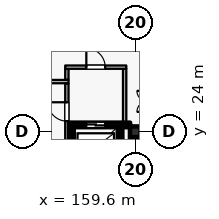
"""IFC4 building model, lengths in metres.
Left out: names, types, materials, properties, quantities, classifications, styles, units other than length and angle.
Written with IfcOpenShell. Run it as: python <this file> out.ifc"""

import sys

from ifc_helpers import new_model, si_unit, direction, frame, frame_2d, origin, origin_2d, place, context, subcontext, project, spatial, rectangle, extrude, element, fill, save


model = new_model("IFC4")
c1 = context("Model", 3, precision=1e-05, world=origin(), true_north=direction((0.0, 1.0)))
c2 = subcontext(c1, "Body", "Model", "MODEL_VIEW")
j1 = project(units=[si_unit("LENGTHUNIT", "METRE"), si_unit("PLANEANGLEUNIT", "RADIAN")], contexts=[c1])
p1 = place(None, origin())
s1 = spatial("IfcSite", under=j1, at=p1, CompositionType="ELEMENT")
p2 = place(p1, origin())
s2 = spatial("IfcBuilding", under=s1, at=p2, CompositionType="ELEMENT")
p3 = place(p2, frame((0.0, 0.0, 32.4)))
s3 = spatial("IfcBuildingStorey", under=s2, at=p3, CompositionType="ELEMENT", Elevation=32.4)
p4 = place(p3, frame((159.6, 24.0, 0.0), z_axis=(0.0, 0.0, 1.0), x_axis=(1.0, 0.0, 0.0)))
e1 = element("IfcColumn", 1, at=p4, inside=s3, PredefinedType="COLUMN", context=c2, shape_type="SweptSolid", body=[
    extrude(rectangle(XDim=0.7, YDim=0.7, at=origin_2d()), origin(), (0.0, 0.0, 1.0), 3.6),
])
p5 = place(p3, frame((158.6, 21.705, 0.0), z_axis=(0.0, 0.0, 1.0), x_axis=(0.0, 1.0, 0.0)))
e2 = element("IfcWall", 2, at=p5, inside=s3, PredefinedType="SHEAR", context=c2, shape_type="SweptSolid", body=[
    extrude(rectangle(XDim=2.59, YDim=0.3, at=frame_2d((1.295, 0.0))), origin(), (0.0, 0.0, 1.0), 3.335),
])
p6 = place(p3, frame((159.26, 24.45, 0.0), z_axis=(0.0, 0.0, 1.0), x_axis=(-1.0, 0.0, 0.0)))
e3 = element("IfcWall", 3, at=p6, inside=s3, PredefinedType="SHEAR", context=c2, shape_type="SweptSolid", body=[
    extrude(rectangle(XDim=4.01, YDim=0.3, at=frame_2d((2.005, 0.0))), origin(), (0.0, 0.0, 1.0), 3.335),
])
p7 = place(p6, frame((1.635, 0.0, 0.0)))
e4 = element("IfcOpeningElement", 4, at=p7, cuts=e3, PredefinedType="OPENING", context=c2, shape_type="SweptSolid", body=[
    extrude(rectangle(XDim=1.25, YDim=2.25, at=frame_2d((0.625, 1.125))), frame((0.0, 0.16, 0.0), z_axis=(0.0, -1.0, 0.0), x_axis=(1.0, 0.0, 0.0)), (0.0, 0.0, 1.0), 0.32),
])
p8 = place(p3, frame((155.4, 24.295, 0.0), z_axis=(0.0, 0.0, 1.0), x_axis=(0.0, -1.0, 0.0)))
e5 = element("IfcWall", 5, at=p8, inside=s3, PredefinedType="SHEAR", context=c2, shape_type="SweptSolid", body=[
    extrude(rectangle(XDim=2.59, YDim=0.3, at=frame_2d((1.295, 0.0))), origin(), (0.0, 0.0, 1.0), 3.335),
])
p9 = place(p3, frame((151.39, 27.3, 0.0), z_axis=(0.0, 0.0, 1.0), x_axis=(1.0, 0.0, 0.0)))
e6 = element("IfcWall", 6, at=p9, inside=s3, PredefinedType="PARTITIONING", context=c2, shape_type="SweptSolid", body=[
    extrude(rectangle(XDim=3.82, YDim=0.22, at=frame_2d((1.91, 0.0))), origin(), (0.0, 0.0, 1.0), 3.335),
])
p10 = place(p9, frame((1.35, 0.0, 0.0)))
e7 = element("IfcOpeningElement", 7, at=p10, cuts=e6, PredefinedType="OPENING", context=c2, shape_type="SweptSolid", body=[
    extrude(rectangle(XDim=1.12, YDim=2.2, at=frame_2d((0.56, 1.1))), frame((0.0, 0.12, 0.0), z_axis=(0.0, -1.0, 0.0), x_axis=(1.0, 0.0, 0.0)), (0.0, 0.0, 1.0), 0.24),
])
p11 = place(p3, frame((155.1, 21.365, 0.0), z_axis=(0.0, 0.0, 1.0), x_axis=(0.0, 1.0, 0.0)))
e8 = element("IfcWall", 8, at=p11, inside=s3, PredefinedType="PARTITIONING", context=c2, shape_type="SweptSolid", body=[
    extrude(rectangle(XDim=5.82, YDim=0.22, at=frame_2d((2.91, 0.0))), origin(), (0.0, 0.0, 1.0), 3.335),
])
p12 = place(p11, frame((3.335, 0.0, 0.0)))
e9 = element("IfcOpeningElement", 9, at=p12, cuts=e8, PredefinedType="OPENING", context=c2, shape_type="SweptSolid", body=[
    extrude(rectangle(XDim=1.24, YDim=2.2, at=frame_2d((0.62, 1.1))), frame((0.0, 0.12, 0.0), z_axis=(0.0, -1.0, 0.0), x_axis=(1.0, 0.0, 0.0)), (0.0, 0.0, 1.0), 0.24),
])
p13 = place(p3, frame((155.1, 27.415, 0.0), z_axis=(0.0, 0.0, 1.0), x_axis=(0.0, 1.0, 0.0)))
e10 = element("IfcWall", 10, at=p13, inside=s3, PredefinedType="PARTITIONING", context=c2, shape_type="SweptSolid", body=[
    extrude(rectangle(XDim=0.72, YDim=0.22, at=frame_2d((0.36, 0.0))), origin(), (0.0, 0.0, 1.0), 3.335),
])
p14 = place(p3, frame((158.9, 24.605, 0.0), z_axis=(0.0, 0.0, 1.0), x_axis=(0.0, 1.0, 0.0)))
e11 = element("IfcWall", 11, at=p14, inside=s3, PredefinedType="PARTITIONING", context=c2, shape_type="SweptSolid", body=[
    extrude(rectangle(XDim=3.53, YDim=0.22, at=frame_2d((1.765, 0.0))), origin(), (0.0, 0.0, 1.0), 3.335),
])
p15 = place(p3, frame((154.99, 28.25, 0.0), z_axis=(0.0, 0.0, 1.0), x_axis=(1.0, 0.0, 0.0)))
e12 = element("IfcWall", 12, at=p15, inside=s3, PredefinedType="PARTITIONING", context=c2, shape_type="SweptSolid", body=[
    extrude(rectangle(XDim=4.02, YDim=0.22, at=frame_2d((2.01, 0.0))), origin(), (0.0, 0.0, 1.0), 3.335),
])
p16 = place(p15, frame((1.39, 0.0, 0.0)))
e13 = element("IfcOpeningElement", 13, at=p16, cuts=e12, PredefinedType="OPENING", context=c2, shape_type="SweptSolid", body=[
    extrude(rectangle(XDim=1.24, YDim=2.2, at=frame_2d((0.62, 1.1))), frame((0.0, 0.12, 0.0), z_axis=(0.0, -1.0, 0.0), x_axis=(1.0, 0.0, 0.0)), (0.0, 0.0, 1.0), 0.24),
])
p17 = place(p7, origin())
e14 = element("IfcDoor", 14, at=p17, inside=s3, OperationType="DOUBLE_DOOR_SLIDING", PredefinedType="DOOR", context=c2, shape_type="SweptSolid", body=[
    extrude(rectangle(XDim=1.25, YDim=2.25, at=frame_2d((0.625, 1.125))), frame((0.0, 0.025, 0.0), z_axis=(0.0, -1.0, 0.0), x_axis=(1.0, 0.0, 0.0)), (0.0, 0.0, 1.0), 0.05),
])
fill(e4, e14)
p18 = place(p12, origin())
e15 = element("IfcDoor", 15, at=p18, inside=s3, OperationType="SINGLE_SWING_RIGHT", PredefinedType="DOOR", context=c2, shape_type="SweptSolid", body=[
    extrude(rectangle(XDim=1.24, YDim=2.2, at=frame_2d((0.62, 1.1))), frame((0.0, 0.025, 0.0), z_axis=(0.0, -1.0, 0.0), x_axis=(1.0, 0.0, 0.0)), (0.0, 0.0, 1.0), 0.05),
])
fill(e9, e15)
p19 = place(p16, origin())
e16 = element("IfcDoor", 16, at=p19, inside=s3, OperationType="SINGLE_SWING_LEFT", PredefinedType="DOOR", context=c2, shape_type="SweptSolid", body=[
    extrude(rectangle(XDim=1.24, YDim=2.2, at=frame_2d((0.62, 1.1))), frame((0.0, 0.025, 0.0), z_axis=(0.0, -1.0, 0.0), x_axis=(1.0, 0.0, 0.0)), (0.0, 0.0, 1.0), 0.05),
])
fill(e13, e16)
save(model, sys.argv[1])
